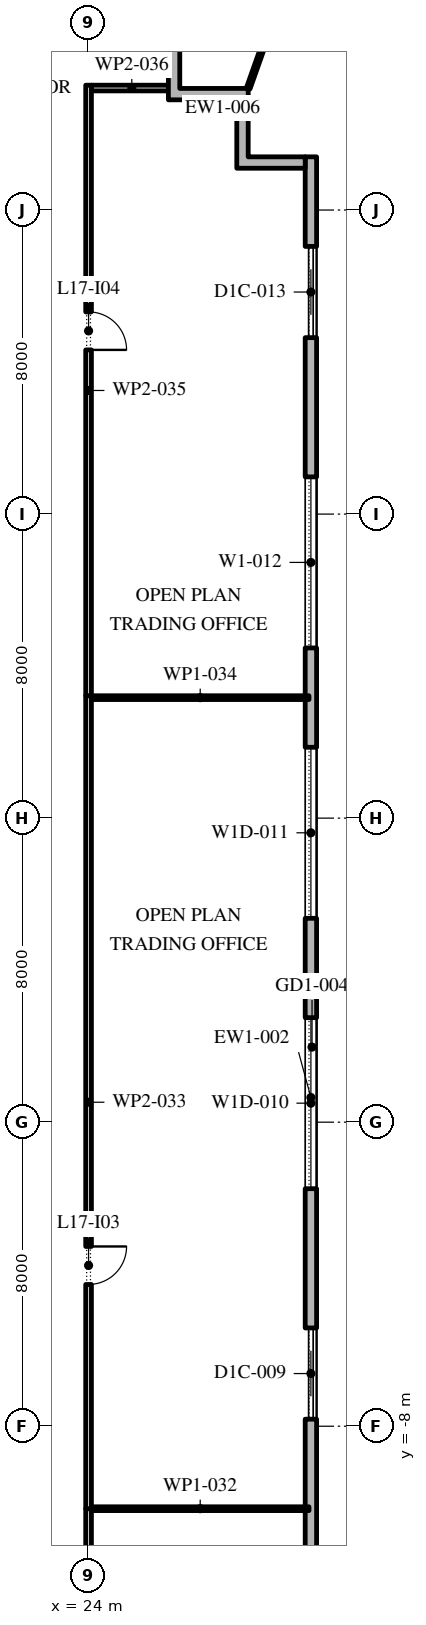
"""IFC4 building model, lengths in metres.
Left out: names, types, materials, properties, quantities, classifications, styles, units other than length and angle.
Written with IfcOpenShell. Run it as: python <this file> out.ifc"""

import sys

from ifc_helpers import new_model, si_unit, direction, frame, frame_2d, origin, place, context, subcontext, project, spatial, polyline, rectangle, outline, extrude, element, fill, save


model = new_model("IFC4")
c1 = context("Model", 3, precision=1e-05, world=origin(), true_north=direction((0.0, 1.0)))
c2 = subcontext(c1, "Body", "Model", "MODEL_VIEW")
j1 = project(units=[si_unit("LENGTHUNIT", "METRE"), si_unit("PLANEANGLEUNIT", "RADIAN")], contexts=[c1])
p1 = place(None, origin())
s1 = spatial("IfcSite", under=j1, at=p1, CompositionType="ELEMENT")
p2 = place(p1, origin())
s2 = spatial("IfcBuilding", under=s1, at=p2, CompositionType="ELEMENT")
p3 = place(p2, frame((0.0, 0.0, 81.6)))
s3 = spatial("IfcBuildingStorey", under=s2, at=p3, CompositionType="ELEMENT", Elevation=81.6)
p4 = place(p3, frame((29.85, -24.1, 0.0), z_axis=(0.0, 0.0, 1.0), x_axis=(0.0, 1.0, 0.0)))
e1 = element("IfcWall", 1, at=p4, inside=s3, PredefinedType="STANDARD", context=c2, shape_type="SweptSolid", body=[
    extrude(rectangle(XDim=49.5, YDim=0.3, at=frame_2d((24.75, 0.0))), origin(), (0.0, 0.0, 1.0), 4.0),
])
p5 = place(p4, frame((1.157, 0.0, 0.45)))
e2 = element("IfcOpeningElement", 2, at=p5, cuts=e1, PredefinedType="OPENING", context=c2, shape_type="SweptSolid", body=[
    extrude(rectangle(XDim=4.5, YDim=3.05, at=frame_2d((2.25, 1.525))), frame((0.0, 0.16, 0.0), z_axis=(0.0, -1.0, 0.0), x_axis=(1.0, 0.0, 0.0)), (0.0, 0.0, 1.0), 0.32),
])
p6 = place(p4, frame((8.121, 0.0, 0.45)))
e3 = element("IfcOpeningElement", 3, at=p6, cuts=e1, PredefinedType="OPENING", context=c2, shape_type="SweptSolid", body=[
    extrude(rectangle(XDim=4.5, YDim=2.825, at=frame_2d((2.25, 1.413))), frame((0.0, 0.16, 0.0), z_axis=(0.0, -1.0, 0.0), x_axis=(1.0, 0.0, 0.0)), (0.0, 0.0, 1.0), 0.32),
])
p7 = place(p4, frame((16.286, 0.0, 0.0)))
e4 = element("IfcOpeningElement", 4, at=p7, cuts=e1, PredefinedType="OPENING", context=c2, shape_type="SweptSolid", body=[
    extrude(rectangle(XDim=2.4, YDim=3.325, at=frame_2d((1.2, 1.663))), frame((0.0, 0.16, 0.0), z_axis=(0.0, -1.0, 0.0), x_axis=(1.0, 0.0, 0.0)), (0.0, 0.0, 1.0), 0.32),
])
p8 = place(p4, frame((22.35, 0.0, 0.45)))
e5 = element("IfcOpeningElement", 5, at=p8, cuts=e1, PredefinedType="OPENING", context=c2, shape_type="SweptSolid", body=[
    extrude(rectangle(XDim=4.5, YDim=2.875, at=frame_2d((2.25, 1.438))), frame((0.0, 0.16, 0.0), z_axis=(0.0, -1.0, 0.0), x_axis=(1.0, 0.0, 0.0)), (0.0, 0.0, 1.0), 0.32),
])
p9 = place(p4, frame((29.464, 0.0, 0.45)))
e6 = element("IfcOpeningElement", 6, at=p9, cuts=e1, PredefinedType="OPENING", context=c2, shape_type="SweptSolid", body=[
    extrude(rectangle(XDim=4.5, YDim=2.875, at=frame_2d((2.25, 1.438))), frame((0.0, 0.16, 0.0), z_axis=(0.0, -1.0, 0.0), x_axis=(1.0, 0.0, 0.0)), (0.0, 0.0, 1.0), 0.32),
])
p10 = place(p4, frame((36.579, 0.0, 0.45)))
e7 = element("IfcOpeningElement", 7, at=p10, cuts=e1, PredefinedType="OPENING", context=c2, shape_type="SweptSolid", body=[
    extrude(rectangle(XDim=4.5, YDim=3.05, at=frame_2d((2.25, 1.525))), frame((0.0, 0.16, 0.0), z_axis=(0.0, -1.0, 0.0), x_axis=(1.0, 0.0, 0.0)), (0.0, 0.0, 1.0), 0.32),
])
p11 = place(p4, frame((44.743, 0.0, 0.0)))
e8 = element("IfcOpeningElement", 8, at=p11, cuts=e1, PredefinedType="OPENING", context=c2, shape_type="SweptSolid", body=[
    extrude(rectangle(XDim=2.4, YDim=3.325, at=frame_2d((1.2, 1.663))), frame((0.0, 0.16, 0.0), z_axis=(0.0, -1.0, 0.0), x_axis=(1.0, 0.0, 0.0)), (0.0, 0.0, 1.0), 0.32),
])
p12 = place(p3, origin())
e9 = element("IfcWall", 9, at=p12, inside=s3, PredefinedType="STANDARD", context=c2, shape_type="SweptSolid", body=[
    extrude(outline(polyline([(27.9, 26.9), (26.1, 26.9), (26.1, 29.0), (26.4, 29.0), (26.4, 27.2), (28.2, 27.2), (28.2, 25.4), (29.7, 25.4), (29.7, 25.1), (27.9, 25.1), (27.9, 26.9)])), origin(), (0.0, 0.0, 1.0), 4.0),
])
p13 = place(p3, frame((28.2, 27.2, -0.05), z_axis=(0.0, 0.0, 1.0), x_axis=(0.334412113697, 0.942426940517, 0.0)))
e10 = element("IfcWall", 10, at=p13, inside=s3, PredefinedType="STANDARD", context=c2, shape_type="SweptSolid", body=[
    extrude(rectangle(XDim=6.167, YDim=0.1, at=frame_2d((3.083, 0.0))), origin(), (0.0, 0.0, 1.0), 4.05),
])
p14 = place(p3, frame((24.0, -10.17, 0.0), z_axis=(0.0, 0.0, 1.0), x_axis=(0.0, -1.0, 0.0)))
e11 = element("IfcWall", 11, at=p14, inside=s3, PredefinedType="PARTITIONING", context=c2, shape_type="SweptSolid", body=[
    extrude(rectangle(XDim=7.755, YDim=0.15, at=frame_2d((3.877, 0.0))), origin(), (0.0, 0.0, 1.0), 4.0),
])
p15 = place(p3, frame((24.075, -10.17, 0.0), z_axis=(0.0, 0.0, 1.0), x_axis=(1.0, 0.0, 0.0)))
e12 = element("IfcWall", 12, at=p15, inside=s3, PredefinedType="PARTITIONING", context=c2, shape_type="SweptSolid", body=[
    extrude(rectangle(XDim=5.725, YDim=0.1, at=frame_2d((2.863, 0.0))), origin(), (0.0, 0.0, 1.0), 4.0),
])
p16 = place(p3, frame((24.0, 11.22, 0.0), z_axis=(0.0, 0.0, 1.0), x_axis=(0.0, -1.0, 0.0)))
e13 = element("IfcWall", 13, at=p16, inside=s3, PredefinedType="PARTITIONING", context=c2, shape_type="SweptSolid", body=[
    extrude(rectangle(XDim=21.39, YDim=0.15, at=frame_2d((10.695, 0.0))), origin(), (0.0, 0.0, 1.0), 4.0),
])
p17 = place(p16, frame((14.49, 0.0, 0.0)))
e14 = element("IfcOpeningElement", 14, at=p17, cuts=e13, PredefinedType="OPENING", context=c2, shape_type="SweptSolid", body=[
    extrude(rectangle(XDim=1.0, YDim=2.1, at=frame_2d((0.5, 1.05))), frame((0.0, 0.085, 0.0), z_axis=(0.0, -1.0, 0.0), x_axis=(1.0, 0.0, 0.0)), (0.0, 0.0, 1.0), 0.17),
])
p18 = place(p3, frame((24.075, 11.17, 0.0), z_axis=(0.0, 0.0, 1.0), x_axis=(1.0, 0.0, 0.0)))
e15 = element("IfcWall", 15, at=p18, inside=s3, PredefinedType="PARTITIONING", context=c2, shape_type="SweptSolid", body=[
    extrude(rectangle(XDim=5.725, YDim=0.1, at=frame_2d((2.863, 0.0))), origin(), (0.0, 0.0, 1.0), 4.0),
])
p19 = place(p3, frame((24.0, 27.285, 0.0), z_axis=(0.0, 0.0, 1.0), x_axis=(0.0, -1.0, 0.0)))
e16 = element("IfcWall", 16, at=p19, inside=s3, PredefinedType="PARTITIONING", context=c2, shape_type="SweptSolid", body=[
    extrude(rectangle(XDim=16.065, YDim=0.15, at=frame_2d((8.032, 0.0))), origin(), (0.0, 0.0, 1.0), 4.0),
])
p20 = place(p19, frame((5.965, 0.0, 0.0)))
e17 = element("IfcOpeningElement", 17, at=p20, cuts=e16, PredefinedType="OPENING", context=c2, shape_type="SweptSolid", body=[
    extrude(rectangle(XDim=1.0, YDim=2.1, at=frame_2d((0.5, 1.05))), frame((0.0, 0.085, 0.0), z_axis=(0.0, -1.0, 0.0), x_axis=(1.0, 0.0, 0.0)), (0.0, 0.0, 1.0), 0.17),
])
p21 = place(p3, frame((26.2, 27.21, 0.0), z_axis=(0.0, 0.0, 1.0), x_axis=(-1.0, 0.0, 0.0)))
e18 = element("IfcWall", 18, at=p21, inside=s3, PredefinedType="PARTITIONING", context=c2, shape_type="SweptSolid", body=[
    extrude(rectangle(XDim=2.125, YDim=0.15, at=frame_2d((1.062, 0.0))), origin(), (0.0, 0.0, 1.0), 4.0),
])
p22 = place(p7, origin())
e19 = element("IfcDoor", 19, at=p22, inside=s3, OperationType="DOUBLE_DOOR_SLIDING", PredefinedType="DOOR", context=c2, shape_type="SweptSolid", body=[
    extrude(rectangle(XDim=2.4, YDim=3.325, at=frame_2d((1.2, 1.663))), frame((0.0, 0.025, 0.0), z_axis=(0.0, -1.0, 0.0), x_axis=(1.0, 0.0, 0.0)), (0.0, 0.0, 1.0), 0.05),
])
fill(e4, e19)
p23 = place(p8, origin())
e20 = element("IfcWindow", 20, at=p23, inside=s3, PartitioningType="DOUBLE_PANEL_VERTICAL", PredefinedType="WINDOW", context=c2, shape_type="SweptSolid", body=[
    extrude(rectangle(XDim=4.5, YDim=2.875, at=frame_2d((2.25, 1.438))), frame((0.0, 0.03, 0.0), z_axis=(0.0, -1.0, 0.0), x_axis=(1.0, 0.0, 0.0)), (0.0, 0.0, 1.0), 0.06),
])
fill(e5, e20)
p24 = place(p9, origin())
e21 = element("IfcWindow", 21, at=p24, inside=s3, PartitioningType="DOUBLE_PANEL_VERTICAL", PredefinedType="WINDOW", context=c2, shape_type="SweptSolid", body=[
    extrude(rectangle(XDim=4.5, YDim=2.875, at=frame_2d((2.25, 1.438))), frame((0.0, 0.03, 0.0), z_axis=(0.0, -1.0, 0.0), x_axis=(1.0, 0.0, 0.0)), (0.0, 0.0, 1.0), 0.06),
])
fill(e6, e21)
p25 = place(p10, origin())
e22 = element("IfcWindow", 22, at=p25, inside=s3, PartitioningType="DOUBLE_PANEL_VERTICAL", PredefinedType="WINDOW", context=c2, shape_type="SweptSolid", body=[
    extrude(rectangle(XDim=4.5, YDim=3.05, at=frame_2d((2.25, 1.525))), frame((0.0, 0.03, 0.0), z_axis=(0.0, -1.0, 0.0), x_axis=(1.0, 0.0, 0.0)), (0.0, 0.0, 1.0), 0.06),
])
fill(e7, e22)
p26 = place(p11, origin())
e23 = element("IfcDoor", 23, at=p26, inside=s3, OperationType="DOUBLE_DOOR_SLIDING", PredefinedType="DOOR", context=c2, shape_type="SweptSolid", body=[
    extrude(rectangle(XDim=2.4, YDim=3.325, at=frame_2d((1.2, 1.663))), frame((0.0, 0.025, 0.0), z_axis=(0.0, -1.0, 0.0), x_axis=(1.0, 0.0, 0.0)), (0.0, 0.0, 1.0), 0.05),
])
fill(e8, e23)
p27 = place(p17, origin())
e24 = element("IfcDoor", 24, at=p27, inside=s3, OperationType="SINGLE_SWING_RIGHT", PredefinedType="DOOR", context=c2, shape_type="SweptSolid", body=[
    extrude(rectangle(XDim=1.0, YDim=2.1, at=frame_2d((0.5, 1.05))), frame((0.0, 0.025, 0.0), z_axis=(0.0, -1.0, 0.0), x_axis=(1.0, 0.0, 0.0)), (0.0, 0.0, 1.0), 0.05),
])
fill(e14, e24)
p28 = place(p20, origin())
e25 = element("IfcDoor", 25, at=p28, inside=s3, OperationType="SINGLE_SWING_LEFT", PredefinedType="DOOR", context=c2, shape_type="SweptSolid", body=[
    extrude(rectangle(XDim=1.0, YDim=2.1, at=frame_2d((0.5, 1.05))), frame((0.0, 0.025, 0.0), z_axis=(0.0, -1.0, 0.0), x_axis=(1.0, 0.0, 0.0)), (0.0, 0.0, 1.0), 0.05),
])
fill(e17, e25)
save(model, sys.argv[1])
